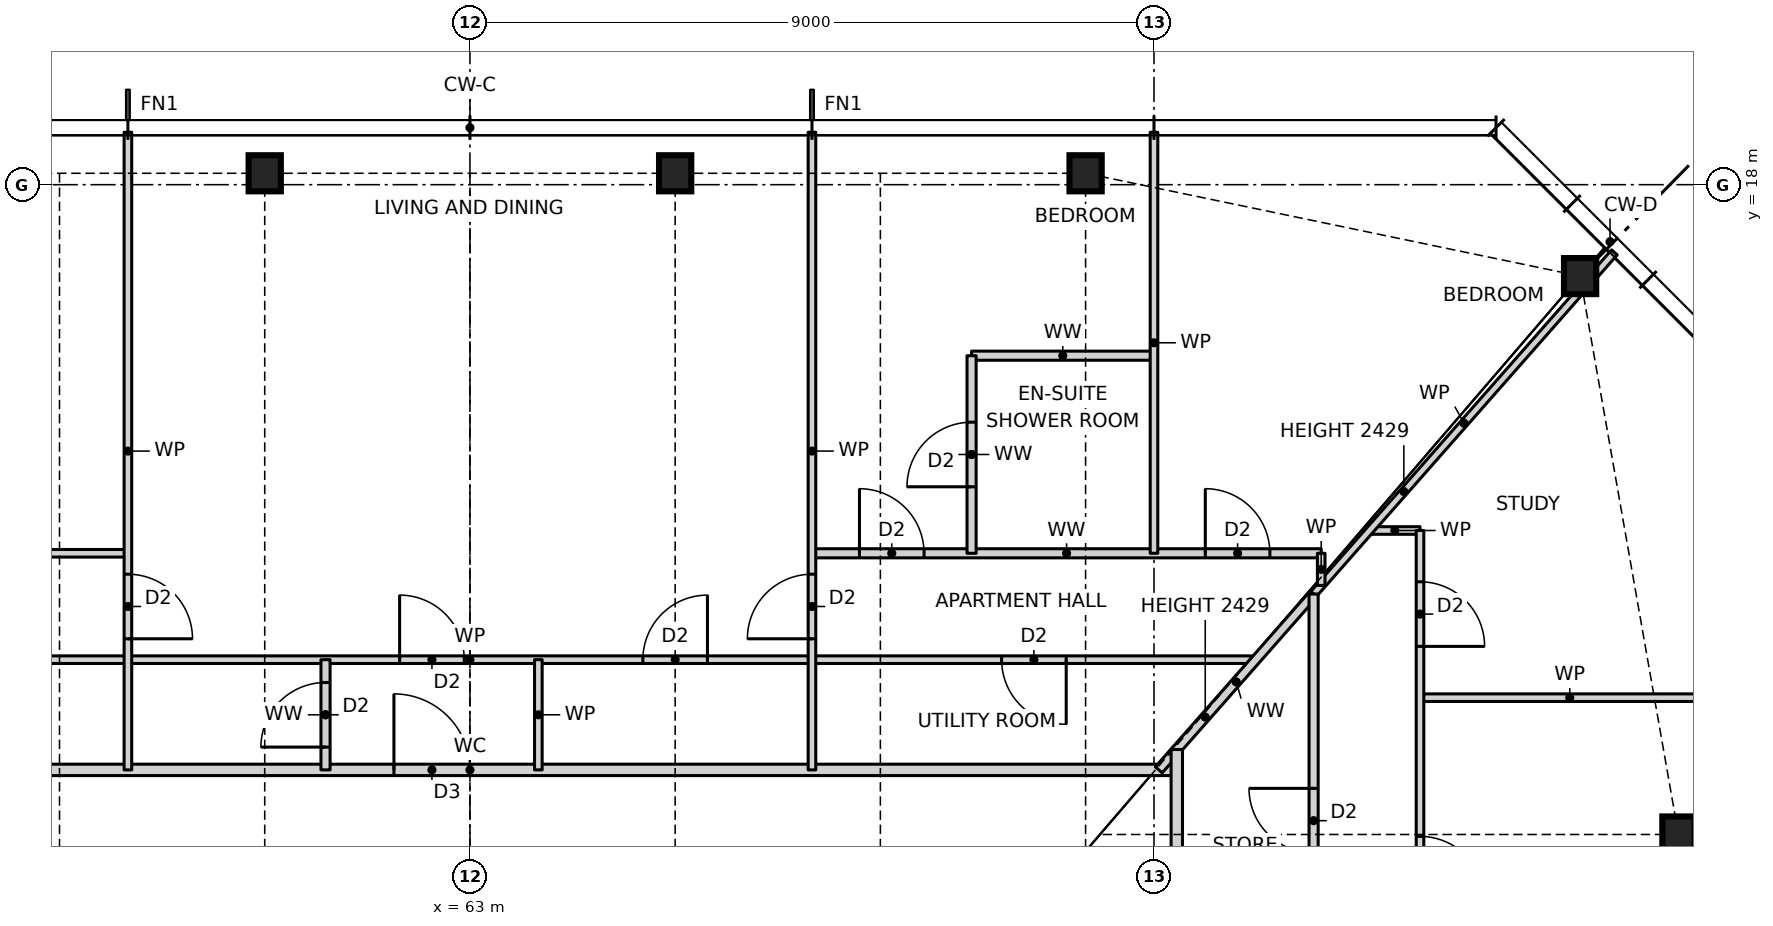
"""IFC4 building model, lengths in metres.
Left out: names, types, materials, properties, quantities, classifications, styles, units other than length and angle.
Written with IfcOpenShell. Run it as: python <this file> out.ifc"""

import sys

from ifc_helpers import new_model, si_unit, direction, frame, frame_2d, origin, origin_2d, place, context, subcontext, project, spatial, rectangle, i_section, extrude, element, fill, save


model = new_model("IFC4")
c1 = context("Model", 3, precision=1e-05, world=origin(), true_north=direction((0.0, 1.0)))
c2 = subcontext(c1, "Body", "Model", "MODEL_VIEW")
j1 = project(units=[si_unit("LENGTHUNIT", "METRE"), si_unit("PLANEANGLEUNIT", "RADIAN")], contexts=[c1])
p1 = place(None, origin())
s1 = spatial("IfcSite", under=j1, at=p1, CompositionType="ELEMENT")
p2 = place(p1, origin())
s2 = spatial("IfcBuilding", under=s1, at=p2, CompositionType="ELEMENT")
p3 = place(p2, frame((0.0, 0.0, 25.5)))
s3 = spatial("IfcBuildingStorey", under=s2, at=p3, CompositionType="ELEMENT", Elevation=25.5)
for number, where, z_axis, x_axis in (
    (1, (78.9, 9.45, 0.0), (0.0, 0.0, 1.0), (1.0, 0.0, 0.0)),
    (2, (77.606, 16.797, 0.0), (0.0, 0.0, 1.0), (1.0, 0.0, 0.0)),
    (3, (71.1, 18.15, 0.0), (0.0, 0.0, 1.0), (1.0, 0.0, 0.0)),
    (4, (65.7, 18.15, 0.0), (0.0, 0.0, 1.0), (1.0, 0.0, 0.0)),
    (5, (60.3, 18.15, 0.0), (0.0, 0.0, 1.0), (1.0, 0.0, 0.0)),
):
    element("IfcColumn", number, at=place(p3, frame(where, z_axis=z_axis, x_axis=x_axis)), inside=s3, PredefinedType="COLUMN", context=c2, shape_type="SweptSolid", body=[
        extrude(i_section(OverallWidth=0.424, OverallDepth=0.475, WebThickness=0.048, FlangeThickness=0.077, at=origin_2d()), origin(), (0.0, 0.0, 1.0), 3.5),
    ])
p4 = place(p3, frame((53.7, 10.3, 0.0), z_axis=(0.0, 0.0, 1.0), x_axis=(1.0, 0.0, 0.0)))
e6 = element("IfcWall", 6, at=p4, inside=s3, PredefinedType="PARTITIONING", context=c2, shape_type="SweptSolid", body=[
    extrude(rectangle(XDim=18.6, YDim=0.15, at=frame_2d((9.3, 0.0))), origin(), (0.0, 0.0, 1.0), 3.27),
])
p5 = place(p4, frame((8.3, 0.0, 0.0)))
e7 = element("IfcOpeningElement", 7, at=p5, cuts=e6, PredefinedType="OPENING", context=c2, shape_type="SweptSolid", body=[
    extrude(rectangle(XDim=1.0, YDim=2.1, at=frame_2d((0.5, 1.05))), frame((0.0, 0.085, 0.0), z_axis=(0.0, -1.0, 0.0), x_axis=(1.0, 0.0, 0.0)), (0.0, 0.0, 1.0), 0.17),
])
p6 = place(p3, frame((75.5, 11.25, 0.0), z_axis=(0.0, 0.0, 1.0), x_axis=(1.0, 0.0, 0.0)))
e8 = element("IfcWall", 8, at=p6, inside=s3, PredefinedType="PARTITIONING", context=c2, shape_type="SweptSolid", body=[
    extrude(rectangle(XDim=3.94, YDim=0.1, at=frame_2d((1.97, 0.0))), origin(), (0.0, 0.0, 1.0), 3.27),
])
p7 = place(p3, frame((52.66, 11.75, 0.0), z_axis=(0.0, 0.0, 1.0), x_axis=(1.0, 0.0, 0.0)))
e9 = element("IfcWall", 9, at=p7, inside=s3, PredefinedType="PARTITIONING", context=c2, shape_type="SweptSolid", body=[
    extrude(rectangle(XDim=20.68, YDim=0.1, at=frame_2d((10.34, 0.0))), origin(), (0.0, 0.0, 1.0), 3.27),
])
p8 = place(p7, frame((12.615, 0.0, 0.0)))
e10 = element("IfcOpeningElement", 10, at=p8, cuts=e9, PredefinedType="OPENING", context=c2, shape_type="SweptSolid", body=[
    extrude(rectangle(XDim=0.85, YDim=2.1, at=frame_2d((0.425, 1.05))), frame((0.0, 0.06, 0.0), z_axis=(0.0, -1.0, 0.0), x_axis=(1.0, 0.0, 0.0)), (0.0, 0.0, 1.0), 0.12),
])
p9 = place(p7, frame((9.415, 0.0, 0.0)))
e11 = element("IfcOpeningElement", 11, at=p9, cuts=e9, PredefinedType="OPENING", context=c2, shape_type="SweptSolid", body=[
    extrude(rectangle(XDim=0.85, YDim=2.1, at=frame_2d((0.425, 1.05))), frame((0.0, 0.06, 0.0), z_axis=(0.0, -1.0, 0.0), x_axis=(1.0, 0.0, 0.0)), (0.0, 0.0, 1.0), 0.12),
])
p10 = place(p7, frame((17.335, 0.0, 0.0)))
e12 = element("IfcOpeningElement", 12, at=p10, cuts=e9, PredefinedType="OPENING", context=c2, shape_type="SweptSolid", body=[
    extrude(rectangle(XDim=0.85, YDim=2.1, at=frame_2d((0.425, 1.05))), frame((0.0, 0.06, 0.0), z_axis=(0.0, -1.0, 0.0), x_axis=(1.0, 0.0, 0.0)), (0.0, 0.0, 1.0), 0.12),
])
p11 = place(p7, frame((2.495, 0.0, 0.0)))
e13 = element("IfcOpeningElement", 13, at=p11, cuts=e9, PredefinedType="OPENING", context=c2, shape_type="SweptSolid", body=[
    extrude(rectangle(XDim=0.85, YDim=2.1, at=frame_2d((0.425, 1.05))), frame((0.0, 0.06, 0.0), z_axis=(0.0, -1.0, 0.0), x_axis=(1.0, 0.0, 0.0)), (0.0, 0.0, 1.0), 0.12),
])
p12 = place(p3, frame((51.8, 13.15, 0.0), z_axis=(0.0, 0.0, 1.0), x_axis=(1.0, 0.0, 0.0)))
e14 = element("IfcWall", 14, at=p12, inside=s3, PredefinedType="PARTITIONING", context=c2, shape_type="SweptSolid", body=[
    extrude(rectangle(XDim=6.7, YDim=0.1, at=frame_2d((3.35, 0.0))), origin(), (0.0, 0.0, 1.0), 3.27),
])
p13 = place(p12, frame((4.025, 0.0, 0.0)))
e15 = element("IfcOpeningElement", 15, at=p13, cuts=e14, PredefinedType="OPENING", context=c2, shape_type="SweptSolid", body=[
    extrude(rectangle(XDim=0.85, YDim=2.1, at=frame_2d((0.425, 1.05))), frame((0.0, 0.06, 0.0), z_axis=(0.0, -1.0, 0.0), x_axis=(1.0, 0.0, 0.0)), (0.0, 0.0, 1.0), 0.12),
])
p14 = place(p12, frame((0.675, 0.0, 0.0)))
e16 = element("IfcOpeningElement", 16, at=p14, cuts=e14, PredefinedType="OPENING", context=c2, shape_type="SweptSolid", body=[
    extrude(rectangle(XDim=0.85, YDim=2.1, at=frame_2d((0.425, 1.05))), frame((0.0, 0.06, 0.0), z_axis=(0.0, -1.0, 0.0), x_axis=(1.0, 0.0, 0.0)), (0.0, 0.0, 1.0), 0.12),
])
p15 = place(p3, frame((67.5, 13.15, 0.0), z_axis=(0.0, 0.0, 1.0), x_axis=(1.0, 0.0, 0.0)))
e17 = element("IfcWall", 17, at=p15, inside=s3, PredefinedType="PARTITIONING", context=c2, shape_type="SweptSolid", body=[
    extrude(rectangle(XDim=6.7, YDim=0.12, at=frame_2d((3.35, 0.0))), origin(), (0.0, 0.0, 1.0), 3.27),
])
p16 = place(p15, frame((0.625, 0.0, 0.0)))
e18 = element("IfcOpeningElement", 18, at=p16, cuts=e17, PredefinedType="OPENING", context=c2, shape_type="SweptSolid", body=[
    extrude(rectangle(XDim=0.85, YDim=2.1, at=frame_2d((0.425, 1.05))), frame((0.0, 0.07, 0.0), z_axis=(0.0, -1.0, 0.0), x_axis=(1.0, 0.0, 0.0)), (0.0, 0.0, 1.0), 0.14),
])
p17 = place(p15, frame((5.175, 0.0, 0.0)))
e19 = element("IfcOpeningElement", 19, at=p17, cuts=e17, PredefinedType="OPENING", context=c2, shape_type="SweptSolid", body=[
    extrude(rectangle(XDim=0.85, YDim=2.1, at=frame_2d((0.425, 1.05))), frame((0.0, 0.07, 0.0), z_axis=(0.0, -1.0, 0.0), x_axis=(1.0, 0.0, 0.0)), (0.0, 0.0, 1.0), 0.14),
])
p18 = place(p3, frame((74.836, 13.45, 0.0), z_axis=(0.0, 0.0, 1.0), x_axis=(1.0, 0.0, 0.0)))
e20 = element("IfcWall", 20, at=p18, inside=s3, PredefinedType="PARTITIONING", context=c2, shape_type="SweptSolid", body=[
    extrude(rectangle(XDim=0.664, YDim=0.1, at=frame_2d((0.332, 0.0))), origin(), (0.0, 0.0, 1.0), 3.27),
])
p19 = place(p3, frame((69.6, 15.75, 0.0), z_axis=(0.0, 0.0, 1.0), x_axis=(1.0, 0.0, 0.0)))
e21 = element("IfcWall", 21, at=p19, inside=s3, PredefinedType="PARTITIONING", context=c2, shape_type="SweptSolid", body=[
    extrude(rectangle(XDim=2.4, YDim=0.12, at=frame_2d((1.2, 0.0))), origin(), (0.0, 0.0, 1.0), 3.27),
])
p20 = place(p3, frame((74.1, 12.614, 0.0), z_axis=(0.0, 0.0, 1.0), x_axis=(0.660755619739, 0.750601099775, 0.0)))
e22 = element("IfcWall", 22, at=p20, inside=s3, PredefinedType="PARTITIONING", context=c2, shape_type="SweptSolid", body=[
    extrude(rectangle(XDim=5.989, YDim=0.1, at=frame_2d((2.995, 0.0))), origin(), (0.0, 0.0, 1.0), 2.429),
])
p21 = place(p3, frame((72.063, 10.301, 0.0), z_axis=(0.0, 0.0, 1.0), x_axis=(0.660761820138, 0.750595641506, 0.0)))
e23 = element("IfcWall", 23, at=p21, inside=s3, PredefinedType="PARTITIONING", context=c2, shape_type="SweptSolid", body=[
    extrude(rectangle(XDim=3.082, YDim=0.12, at=frame_2d((1.541, 0.0))), origin(), (0.0, 0.0, 1.0), 2.429),
])
p22 = place(p3, frame((75.5, 2.25, 0.0), z_axis=(0.0, 0.0, 1.0), x_axis=(0.0, 1.0, 0.0)))
e24 = element("IfcWall", 24, at=p22, inside=s3, PredefinedType="PARTITIONING", context=c2, shape_type="SweptSolid", body=[
    extrude(rectangle(XDim=11.2, YDim=0.1, at=frame_2d((5.6, 0.0))), origin(), (0.0, 0.0, 1.0), 3.27),
])
p23 = place(p22, frame((1.825, 0.0, 0.0)))
e25 = element("IfcOpeningElement", 25, at=p23, cuts=e24, PredefinedType="OPENING", context=c2, shape_type="SweptSolid", body=[
    extrude(rectangle(XDim=0.85, YDim=2.1, at=frame_2d((0.425, 1.05))), frame((0.0, 0.06, 0.0), z_axis=(0.0, -1.0, 0.0), x_axis=(1.0, 0.0, 0.0)), (0.0, 0.0, 1.0), 0.12),
])
p24 = place(p22, frame((6.325, 0.0, 0.0)))
e26 = element("IfcOpeningElement", 26, at=p24, cuts=e24, PredefinedType="OPENING", context=c2, shape_type="SweptSolid", body=[
    extrude(rectangle(XDim=0.85, YDim=2.1, at=frame_2d((0.425, 1.05))), frame((0.0, 0.06, 0.0), z_axis=(0.0, -1.0, 0.0), x_axis=(1.0, 0.0, 0.0)), (0.0, 0.0, 1.0), 0.12),
])
p25 = place(p22, frame((9.675, 0.0, 0.0)))
e27 = element("IfcOpeningElement", 27, at=p25, cuts=e24, PredefinedType="OPENING", context=c2, shape_type="SweptSolid", body=[
    extrude(rectangle(XDim=0.85, YDim=2.1, at=frame_2d((0.425, 1.05))), frame((0.0, 0.06, 0.0), z_axis=(0.0, -1.0, 0.0), x_axis=(1.0, 0.0, 0.0)), (0.0, 0.0, 1.0), 0.12),
])
p26 = place(p3, frame((74.2, 12.727, 0.0), z_axis=(0.0, 0.0, 1.0), x_axis=(0.0, 1.0, 0.0)))
e28 = element("IfcWall", 28, at=p26, inside=s3, PredefinedType="PARTITIONING", context=c2, shape_type="SweptSolid", body=[
    extrude(rectangle(XDim=0.423, YDim=0.1, at=frame_2d((0.211, 0.0))), origin(), (0.0, 0.0, 1.0), 3.27),
])
p27 = place(p3, frame((74.1, -12.614, 0.0), z_axis=(0.0, 0.0, 1.0), x_axis=(0.0, 1.0, 0.0)))
e29 = element("IfcWall", 29, at=p27, inside=s3, PredefinedType="PARTITIONING", context=c2, shape_type="SweptSolid", body=[
    extrude(rectangle(XDim=25.228, YDim=0.12, at=frame_2d((12.614, 0.0))), origin(), (0.0, 0.0, 1.0), 3.27),
])
p28 = place(p27, frame((7.239, 0.0, 0.0)))
e30 = element("IfcOpeningElement", 30, at=p28, cuts=e29, PredefinedType="OPENING", context=c2, shape_type="SweptSolid", body=[
    extrude(rectangle(XDim=0.85, YDim=2.1, at=frame_2d((0.425, 1.05))), frame((0.0, 0.07, 0.0), z_axis=(0.0, -1.0, 0.0), x_axis=(1.0, 0.0, 0.0)), (0.0, 0.0, 1.0), 0.14),
])
p29 = place(p27, frame((10.439, 0.0, 0.0)))
e31 = element("IfcOpeningElement", 31, at=p29, cuts=e29, PredefinedType="OPENING", context=c2, shape_type="SweptSolid", body=[
    extrude(rectangle(XDim=0.85, YDim=2.1, at=frame_2d((0.425, 1.05))), frame((0.0, 0.07, 0.0), z_axis=(0.0, -1.0, 0.0), x_axis=(1.0, 0.0, 0.0)), (0.0, 0.0, 1.0), 0.14),
])
p30 = place(p27, frame((2.507, 0.0, 0.0)))
e32 = element("IfcOpeningElement", 32, at=p30, cuts=e29, PredefinedType="OPENING", context=c2, shape_type="SweptSolid", body=[
    extrude(rectangle(XDim=0.85, YDim=2.1, at=frame_2d((0.425, 1.05))), frame((0.0, 0.07, 0.0), z_axis=(0.0, -1.0, 0.0), x_axis=(1.0, 0.0, 0.0)), (0.0, 0.0, 1.0), 0.14),
])
p31 = place(p27, frame((16.639, 0.0, 0.0)))
e33 = element("IfcOpeningElement", 33, at=p31, cuts=e29, PredefinedType="OPENING", context=c2, shape_type="SweptSolid", body=[
    extrude(rectangle(XDim=0.85, YDim=2.1, at=frame_2d((0.425, 1.05))), frame((0.0, 0.07, 0.0), z_axis=(0.0, -1.0, 0.0), x_axis=(1.0, 0.0, 0.0)), (0.0, 0.0, 1.0), 0.14),
])
p32 = place(p27, frame((21.821, 0.0, 0.0)))
e34 = element("IfcOpeningElement", 34, at=p32, cuts=e29, PredefinedType="OPENING", context=c2, shape_type="SweptSolid", body=[
    extrude(rectangle(XDim=0.85, YDim=2.1, at=frame_2d((0.425, 1.05))), frame((0.0, 0.07, 0.0), z_axis=(0.0, -1.0, 0.0), x_axis=(1.0, 0.0, 0.0)), (0.0, 0.0, 1.0), 0.14),
])
p33 = place(p3, frame((72.3, -10.568, 0.0), z_axis=(0.0, 0.0, 1.0), x_axis=(0.0, 1.0, 0.0)))
e35 = element("IfcWall", 35, at=p33, inside=s3, PredefinedType="PARTITIONING", context=c2, shape_type="SweptSolid", body=[
    extrude(rectangle(XDim=21.136, YDim=0.15, at=frame_2d((10.568, 0.0))), origin(), (0.0, 0.0, 1.0), 3.27),
])
p34 = place(p33, frame((8.318, 0.0, 0.0)))
e36 = element("IfcOpeningElement", 36, at=p34, cuts=e35, PredefinedType="OPENING", context=c2, shape_type="SweptSolid", body=[
    extrude(rectangle(XDim=1.0, YDim=2.1, at=frame_2d((0.5, 1.05))), frame((0.0, 0.085, 0.0), z_axis=(0.0, -1.0, 0.0), x_axis=(1.0, 0.0, 0.0)), (0.0, 0.0, 1.0), 0.17),
])
p35 = place(p3, frame((72.0, 13.15, 0.0), z_axis=(0.0, 0.0, 1.0), x_axis=(0.0, 1.0, 0.0)))
e37 = element("IfcWall", 37, at=p35, inside=s3, PredefinedType="PARTITIONING", context=c2, shape_type="SweptSolid", body=[
    extrude(rectangle(XDim=5.54, YDim=0.1, at=frame_2d((2.77, 0.0))), origin(), (0.0, 0.0, 1.0), 3.27),
])
p36 = place(p3, frame((69.6, 13.15, 0.0), z_axis=(0.0, 0.0, 1.0), x_axis=(0.0, 1.0, 0.0)))
e38 = element("IfcWall", 38, at=p36, inside=s3, PredefinedType="PARTITIONING", context=c2, shape_type="SweptSolid", body=[
    extrude(rectangle(XDim=2.6, YDim=0.12, at=frame_2d((1.3, 0.0))), origin(), (0.0, 0.0, 1.0), 3.27),
])
p37 = place(p36, frame((0.875, 0.0, 0.0)))
e39 = element("IfcOpeningElement", 39, at=p37, cuts=e38, PredefinedType="OPENING", context=c2, shape_type="SweptSolid", body=[
    extrude(rectangle(XDim=0.85, YDim=2.1, at=frame_2d((0.425, 1.05))), frame((0.0, 0.07, 0.0), z_axis=(0.0, -1.0, 0.0), x_axis=(1.0, 0.0, 0.0)), (0.0, 0.0, 1.0), 0.14),
])
p38 = place(p3, frame((67.5, 10.3, 0.0), z_axis=(0.0, 0.0, 1.0), x_axis=(0.0, 1.0, 0.0)))
e40 = element("IfcWall", 40, at=p38, inside=s3, PredefinedType="PARTITIONING", context=c2, shape_type="SweptSolid", body=[
    extrude(rectangle(XDim=8.39, YDim=0.1, at=frame_2d((4.195, 0.0))), origin(), (0.0, 0.0, 1.0), 3.27),
])
p39 = place(p38, frame((1.725, 0.0, 0.0)))
e41 = element("IfcOpeningElement", 41, at=p39, cuts=e40, PredefinedType="OPENING", context=c2, shape_type="SweptSolid", body=[
    extrude(rectangle(XDim=0.85, YDim=2.1, at=frame_2d((0.425, 1.05))), frame((0.0, 0.06, 0.0), z_axis=(0.0, -1.0, 0.0), x_axis=(1.0, 0.0, 0.0)), (0.0, 0.0, 1.0), 0.12),
])
p40 = place(p3, frame((63.9, 10.3, 0.0), z_axis=(0.0, 0.0, 1.0), x_axis=(0.0, 1.0, 0.0)))
e42 = element("IfcWall", 42, at=p40, inside=s3, PredefinedType="PARTITIONING", context=c2, shape_type="SweptSolid", body=[
    extrude(rectangle(XDim=1.45, YDim=0.1, at=frame_2d((0.725, 0.0))), origin(), (0.0, 0.0, 1.0), 3.27),
])
p41 = place(p3, frame((61.1, 10.3, 0.0), z_axis=(0.0, 0.0, 1.0), x_axis=(0.0, 1.0, 0.0)))
e43 = element("IfcWall", 43, at=p41, inside=s3, PredefinedType="PARTITIONING", context=c2, shape_type="SweptSolid", body=[
    extrude(rectangle(XDim=1.45, YDim=0.12, at=frame_2d((0.725, 0.0))), origin(), (0.0, 0.0, 1.0), 3.27),
])
p42 = place(p41, frame((0.3, 0.0, 0.0)))
e44 = element("IfcOpeningElement", 44, at=p42, cuts=e43, PredefinedType="OPENING", context=c2, shape_type="SweptSolid", body=[
    extrude(rectangle(XDim=0.85, YDim=2.1, at=frame_2d((0.425, 1.05))), frame((0.0, 0.07, 0.0), z_axis=(0.0, -1.0, 0.0), x_axis=(1.0, 0.0, 0.0)), (0.0, 0.0, 1.0), 0.14),
])
p43 = place(p3, frame((58.5, 10.3, 0.0), z_axis=(0.0, 0.0, 1.0), x_axis=(0.0, 1.0, 0.0)))
e45 = element("IfcWall", 45, at=p43, inside=s3, PredefinedType="PARTITIONING", context=c2, shape_type="SweptSolid", body=[
    extrude(rectangle(XDim=8.39, YDim=0.1, at=frame_2d((4.195, 0.0))), origin(), (0.0, 0.0, 1.0), 3.27),
])
p44 = place(p43, frame((1.725, 0.0, 0.0)))
e46 = element("IfcOpeningElement", 46, at=p44, cuts=e45, PredefinedType="OPENING", context=c2, shape_type="SweptSolid", body=[
    extrude(rectangle(XDim=0.85, YDim=2.1, at=frame_2d((0.425, 1.05))), frame((0.0, 0.06, 0.0), z_axis=(0.0, -1.0, 0.0), x_axis=(1.0, 0.0, 0.0)), (0.0, 0.0, 1.0), 0.12),
])
p45 = place(p24, frame((0.85, 0.0, 0.0), z_axis=(0.0, 0.0, 1.0), x_axis=(-1.0, 0.0, 0.0)))
e47 = element("IfcDoor", 47, at=p45, inside=s3, OperationType="SINGLE_SWING_RIGHT", PredefinedType="DOOR", context=c2, shape_type="SweptSolid", body=[
    extrude(rectangle(XDim=0.85, YDim=2.1, at=frame_2d((0.425, 1.05))), frame((0.0, 0.025, 0.0), z_axis=(0.0, -1.0, 0.0), x_axis=(1.0, 0.0, 0.0)), (0.0, 0.0, 1.0), 0.05),
])
fill(e26, e47)
p46 = place(p25, frame((0.85, 0.0, 0.0), z_axis=(0.0, 0.0, 1.0), x_axis=(-1.0, 0.0, 0.0)))
e48 = element("IfcDoor", 48, at=p46, inside=s3, OperationType="SINGLE_SWING_RIGHT", PredefinedType="DOOR", context=c2, shape_type="SweptSolid", body=[
    extrude(rectangle(XDim=0.85, YDim=2.1, at=frame_2d((0.425, 1.05))), frame((0.0, 0.025, 0.0), z_axis=(0.0, -1.0, 0.0), x_axis=(1.0, 0.0, 0.0)), (0.0, 0.0, 1.0), 0.05),
])
fill(e27, e48)
p47 = place(p32, origin())
e49 = element("IfcDoor", 49, at=p47, inside=s3, OperationType="SINGLE_SWING_RIGHT", PredefinedType="DOOR", context=c2, shape_type="SweptSolid", body=[
    extrude(rectangle(XDim=0.85, YDim=2.1, at=frame_2d((0.425, 1.05))), frame((0.0, 0.025, 0.0), z_axis=(0.0, -1.0, 0.0), x_axis=(1.0, 0.0, 0.0)), (0.0, 0.0, 1.0), 0.05),
])
fill(e34, e49)
p48 = place(p8, origin())
e50 = element("IfcDoor", 50, at=p48, inside=s3, OperationType="SINGLE_SWING_RIGHT", PredefinedType="DOOR", context=c2, shape_type="SweptSolid", body=[
    extrude(rectangle(XDim=0.85, YDim=2.1, at=frame_2d((0.425, 1.05))), frame((0.0, 0.025, 0.0), z_axis=(0.0, -1.0, 0.0), x_axis=(1.0, 0.0, 0.0)), (0.0, 0.0, 1.0), 0.05),
])
fill(e10, e50)
p49 = place(p5, origin())
e51 = element("IfcDoor", 51, at=p49, inside=s3, OperationType="SINGLE_SWING_LEFT", PredefinedType="DOOR", context=c2, shape_type="SweptSolid", body=[
    extrude(rectangle(XDim=1.0, YDim=2.1, at=frame_2d((0.5, 1.05))), frame((0.0, 0.025, 0.0), z_axis=(0.0, -1.0, 0.0), x_axis=(1.0, 0.0, 0.0)), (0.0, 0.0, 1.0), 0.05),
])
fill(e7, e51)
p50 = place(p9, origin())
e52 = element("IfcDoor", 52, at=p50, inside=s3, OperationType="SINGLE_SWING_LEFT", PredefinedType="DOOR", context=c2, shape_type="SweptSolid", body=[
    extrude(rectangle(XDim=0.85, YDim=2.1, at=frame_2d((0.425, 1.05))), frame((0.0, 0.025, 0.0), z_axis=(0.0, -1.0, 0.0), x_axis=(1.0, 0.0, 0.0)), (0.0, 0.0, 1.0), 0.05),
])
fill(e11, e52)
p51 = place(p42, origin())
e53 = element("IfcDoor", 53, at=p51, inside=s3, OperationType="SINGLE_SWING_LEFT", PredefinedType="DOOR", context=c2, shape_type="SweptSolid", body=[
    extrude(rectangle(XDim=0.85, YDim=2.1, at=frame_2d((0.425, 1.05))), frame((0.0, 0.025, 0.0), z_axis=(0.0, -1.0, 0.0), x_axis=(1.0, 0.0, 0.0)), (0.0, 0.0, 1.0), 0.05),
])
fill(e44, e53)
p52 = place(p39, origin())
e54 = element("IfcDoor", 54, at=p52, inside=s3, OperationType="SINGLE_SWING_LEFT", PredefinedType="DOOR", context=c2, shape_type="SweptSolid", body=[
    extrude(rectangle(XDim=0.85, YDim=2.1, at=frame_2d((0.425, 1.05))), frame((0.0, 0.025, 0.0), z_axis=(0.0, -1.0, 0.0), x_axis=(1.0, 0.0, 0.0)), (0.0, 0.0, 1.0), 0.05),
])
fill(e41, e54)
p53 = place(p37, origin())
e55 = element("IfcDoor", 55, at=p53, inside=s3, OperationType="SINGLE_SWING_LEFT", PredefinedType="DOOR", context=c2, shape_type="SweptSolid", body=[
    extrude(rectangle(XDim=0.85, YDim=2.1, at=frame_2d((0.425, 1.05))), frame((0.0, 0.025, 0.0), z_axis=(0.0, -1.0, 0.0), x_axis=(1.0, 0.0, 0.0)), (0.0, 0.0, 1.0), 0.05),
])
fill(e39, e55)
p54 = place(p16, origin())
e56 = element("IfcDoor", 56, at=p54, inside=s3, OperationType="SINGLE_SWING_LEFT", PredefinedType="DOOR", context=c2, shape_type="SweptSolid", body=[
    extrude(rectangle(XDim=0.85, YDim=2.1, at=frame_2d((0.425, 1.05))), frame((0.0, 0.025, 0.0), z_axis=(0.0, -1.0, 0.0), x_axis=(1.0, 0.0, 0.0)), (0.0, 0.0, 1.0), 0.05),
])
fill(e18, e56)
p55 = place(p17, origin())
e57 = element("IfcDoor", 57, at=p55, inside=s3, OperationType="SINGLE_SWING_LEFT", PredefinedType="DOOR", context=c2, shape_type="SweptSolid", body=[
    extrude(rectangle(XDim=0.85, YDim=2.1, at=frame_2d((0.425, 1.05))), frame((0.0, 0.025, 0.0), z_axis=(0.0, -1.0, 0.0), x_axis=(1.0, 0.0, 0.0)), (0.0, 0.0, 1.0), 0.05),
])
fill(e19, e57)
p56 = place(p10, frame((0.85, 0.0, 0.0), z_axis=(0.0, 0.0, 1.0), x_axis=(-1.0, 0.0, 0.0)))
e58 = element("IfcDoor", 58, at=p56, inside=s3, OperationType="SINGLE_SWING_LEFT", PredefinedType="DOOR", context=c2, shape_type="SweptSolid", body=[
    extrude(rectangle(XDim=0.85, YDim=2.1, at=frame_2d((0.425, 1.05))), frame((0.0, 0.025, 0.0), z_axis=(0.0, -1.0, 0.0), x_axis=(1.0, 0.0, 0.0)), (0.0, 0.0, 1.0), 0.05),
])
fill(e12, e58)
p57 = place(p44, frame((0.85, 0.0, 0.0), z_axis=(0.0, 0.0, 1.0), x_axis=(-1.0, 0.0, 0.0)))
e59 = element("IfcDoor", 59, at=p57, inside=s3, OperationType="SINGLE_SWING_RIGHT", PredefinedType="DOOR", context=c2, shape_type="SweptSolid", body=[
    extrude(rectangle(XDim=0.85, YDim=2.1, at=frame_2d((0.425, 1.05))), frame((0.0, 0.025, 0.0), z_axis=(0.0, -1.0, 0.0), x_axis=(1.0, 0.0, 0.0)), (0.0, 0.0, 1.0), 0.05),
])
fill(e46, e59)
save(model, sys.argv[1])
